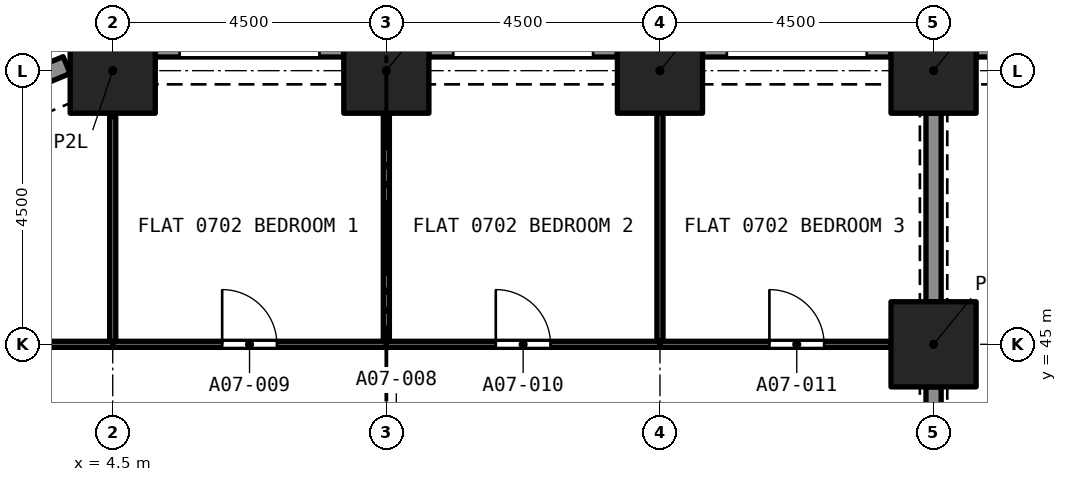
"""IFC4 building model, lengths in metres.
Left out: names, types, materials, properties, quantities, classifications, styles, units other than length and angle.
Written with IfcOpenShell. Run it as: python <this file> out.ifc"""

import sys

from ifc_helpers import new_model, si_unit, direction, frame, frame_2d, origin, origin_2d, place, context, subcontext, project, spatial, rectangle, extrude, element, fill, save


model = new_model("IFC4")
c1 = context("Model", 3, precision=1e-05, world=origin(), true_north=direction((0.0, 1.0)))
c2 = subcontext(c1, "Body", "Model", "MODEL_VIEW")
j1 = project(units=[si_unit("LENGTHUNIT", "METRE"), si_unit("PLANEANGLEUNIT", "RADIAN")], contexts=[c1])
p1 = place(None, origin())
s1 = spatial("IfcSite", under=j1, at=p1, CompositionType="ELEMENT")
p2 = place(p1, origin())
s2 = spatial("IfcBuilding", under=s1, at=p2, CompositionType="ELEMENT")
p3 = place(p2, frame((0.0, 0.0, 33.6)))
s3 = spatial("IfcBuildingStorey", under=s2, at=p3, CompositionType="ELEMENT", Elevation=33.6)
for number, where, z_axis, x_axis in (
    (1, (18.0, 45.0, 0.0), (0.0, 0.0, 1.0), (1.0, 0.0, 0.0)),
    (2, (4.5, 49.5, 0.0), (0.0, 0.0, 1.0), (1.0, 0.0, 0.0)),
    (3, (9.0, 49.5, 0.0), (0.0, 0.0, 1.0), (1.0, 0.0, 0.0)),
    (4, (13.5, 49.5, 0.0), (0.0, 0.0, 1.0), (1.0, 0.0, 0.0)),
    (5, (18.0, 49.5, 0.0), (0.0, 0.0, 1.0), (1.0, 0.0, 0.0)),
):
    element("IfcColumn", number, at=place(p3, frame(where, z_axis=z_axis, x_axis=x_axis)), inside=s3, PredefinedType="COLUMN", context=c2, shape_type="SweptSolid", body=[
        extrude(rectangle(XDim=1.4, YDim=1.4, at=origin_2d()), origin(), (0.0, 0.0, 1.0), 3.2),
    ])
p4 = place(p3, frame((18.7, 49.875, 0.0), z_axis=(0.0, 0.0, 1.0), x_axis=(1.0, 0.0, 0.0)))
e6 = element("IfcWall", 6, at=p4, inside=s3, PredefinedType="SOLIDWALL", context=c2, shape_type="SweptSolid", body=[
    extrude(rectangle(XDim=3.1, YDim=0.3, at=frame_2d((1.55, 0.0))), origin(), (0.0, 0.0, 1.0), 3.2),
])
p5 = place(p4, frame((0.4, 0.0, 0.45)))
e7 = element("IfcOpeningElement", 7, at=p5, cuts=e6, PredefinedType="OPENING", context=c2, shape_type="SweptSolid", body=[
    extrude(rectangle(XDim=2.3, YDim=1.95, at=frame_2d((1.15, 0.975))), frame((0.0, 0.16, 0.0), z_axis=(0.0, -1.0, 0.0), x_axis=(1.0, 0.0, 0.0)), (0.0, 0.0, 1.0), 0.32),
])
p6 = place(p3, frame((14.2, 49.875, 0.0), z_axis=(0.0, 0.0, 1.0), x_axis=(1.0, 0.0, 0.0)))
e8 = element("IfcWall", 8, at=p6, inside=s3, PredefinedType="SOLIDWALL", context=c2, shape_type="SweptSolid", body=[
    extrude(rectangle(XDim=3.1, YDim=0.3, at=frame_2d((1.55, 0.0))), origin(), (0.0, 0.0, 1.0), 3.2),
])
p7 = place(p6, frame((0.4, 0.0, 0.45)))
e9 = element("IfcOpeningElement", 9, at=p7, cuts=e8, PredefinedType="OPENING", context=c2, shape_type="SweptSolid", body=[
    extrude(rectangle(XDim=2.3, YDim=1.95, at=frame_2d((1.15, 0.975))), frame((0.0, 0.16, 0.0), z_axis=(0.0, -1.0, 0.0), x_axis=(1.0, 0.0, 0.0)), (0.0, 0.0, 1.0), 0.32),
])
p8 = place(p3, frame((9.7, 49.875, 0.0), z_axis=(0.0, 0.0, 1.0), x_axis=(1.0, 0.0, 0.0)))
e10 = element("IfcWall", 10, at=p8, inside=s3, PredefinedType="SOLIDWALL", context=c2, shape_type="SweptSolid", body=[
    extrude(rectangle(XDim=3.1, YDim=0.3, at=frame_2d((1.55, 0.0))), origin(), (0.0, 0.0, 1.0), 3.2),
])
p9 = place(p8, frame((0.4, 0.0, 0.45)))
e11 = element("IfcOpeningElement", 11, at=p9, cuts=e10, PredefinedType="OPENING", context=c2, shape_type="SweptSolid", body=[
    extrude(rectangle(XDim=2.3, YDim=1.95, at=frame_2d((1.15, 0.975))), frame((0.0, 0.16, 0.0), z_axis=(0.0, -1.0, 0.0), x_axis=(1.0, 0.0, 0.0)), (0.0, 0.0, 1.0), 0.32),
])
p10 = place(p3, frame((5.2, 49.875, 0.0), z_axis=(0.0, 0.0, 1.0), x_axis=(1.0, 0.0, 0.0)))
e12 = element("IfcWall", 12, at=p10, inside=s3, PredefinedType="SOLIDWALL", context=c2, shape_type="SweptSolid", body=[
    extrude(rectangle(XDim=3.1, YDim=0.3, at=frame_2d((1.55, 0.0))), origin(), (0.0, 0.0, 1.0), 3.2),
])
p11 = place(p10, frame((0.4, 0.0, 0.45)))
e13 = element("IfcOpeningElement", 13, at=p11, cuts=e12, PredefinedType="OPENING", context=c2, shape_type="SweptSolid", body=[
    extrude(rectangle(XDim=2.3, YDim=1.95, at=frame_2d((1.15, 0.975))), frame((0.0, 0.16, 0.0), z_axis=(0.0, -1.0, 0.0), x_axis=(1.0, 0.0, 0.0)), (0.0, 0.0, 1.0), 0.32),
])
p12 = place(p3, frame((2.02, 48.878, 0.0), z_axis=(0.0, 0.0, 1.0), x_axis=(0.923903565336, 0.38262540684, 0.0)))
e14 = element("IfcWall", 14, at=p12, inside=s3, PredefinedType="SOLIDWALL", context=c2, shape_type="SweptSolid", body=[
    extrude(rectangle(XDim=1.865, YDim=0.3, at=frame_2d((0.933, 0.0))), origin(), (0.0, 0.0, 1.0), 3.2),
])
p13 = place(p12, frame((0.258, 0.0, 0.45)))
e15 = element("IfcOpeningElement", 15, at=p13, cuts=e14, PredefinedType="OPENING", context=c2, shape_type="SweptSolid", body=[
    extrude(rectangle(XDim=1.1, YDim=1.95, at=frame_2d((0.55, 0.975))), frame((0.0, 0.16, 0.0), z_axis=(0.0, -1.0, 0.0), x_axis=(1.0, 0.0, 0.0)), (0.0, 0.0, 1.0), 0.32),
])
p14 = place(p3, frame((9.0, 45.05, 0.0), z_axis=(0.0, 0.0, 1.0), x_axis=(0.0, 1.0, 0.0)))
e16 = element("IfcWall", 16, at=p14, inside=s3, PredefinedType="PARTITIONING", context=c2, shape_type="SweptSolid", body=[
    extrude(rectangle(XDim=3.75, YDim=0.1, at=frame_2d((1.875, 0.0))), origin(), (0.0, 0.0, 1.0), 2.9),
])
p15 = place(p3, frame((4.5, 45.0, 0.0), z_axis=(0.0, 0.0, 1.0), x_axis=(1.0, 0.0, 0.0)))
e17 = element("IfcWall", 17, at=p15, inside=s3, PredefinedType="PARTITIONING", context=c2, shape_type="SweptSolid", body=[
    extrude(rectangle(XDim=4.5, YDim=0.1, at=frame_2d((2.25, 0.0))), origin(), (0.0, 0.0, 1.0), 2.9),
])
p16 = place(p15, frame((1.8, 0.0, 0.0)))
e18 = element("IfcOpeningElement", 18, at=p16, cuts=e17, PredefinedType="OPENING", context=c2, shape_type="SweptSolid", body=[
    extrude(rectangle(XDim=0.9, YDim=2.1, at=frame_2d((0.45, 1.05))), frame((0.0, 0.06, 0.0), z_axis=(0.0, -1.0, 0.0), x_axis=(1.0, 0.0, 0.0)), (0.0, 0.0, 1.0), 0.12),
])
p17 = place(p3, frame((4.5, 45.05, 0.0), z_axis=(0.0, 0.0, 1.0), x_axis=(0.0, 1.0, 0.0)))
e19 = element("IfcWall", 19, at=p17, inside=s3, PredefinedType="PARTITIONING", context=c2, shape_type="SweptSolid", body=[
    extrude(rectangle(XDim=3.692, YDim=0.1, at=frame_2d((1.846, 0.0))), origin(), (0.0, 0.0, 1.0), 2.9),
])
p18 = place(p3, frame((13.5, 45.05, 0.0), z_axis=(0.0, 0.0, 1.0), x_axis=(0.0, 1.0, 0.0)))
e20 = element("IfcWall", 20, at=p18, inside=s3, PredefinedType="PARTITIONING", context=c2, shape_type="SweptSolid", body=[
    extrude(rectangle(XDim=3.75, YDim=0.1, at=frame_2d((1.875, 0.0))), origin(), (0.0, 0.0, 1.0), 2.9),
])
p19 = place(p3, frame((9.0, 45.0, 0.0), z_axis=(0.0, 0.0, 1.0), x_axis=(1.0, 0.0, 0.0)))
e21 = element("IfcWall", 21, at=p19, inside=s3, PredefinedType="PARTITIONING", context=c2, shape_type="SweptSolid", body=[
    extrude(rectangle(XDim=4.5, YDim=0.1, at=frame_2d((2.25, 0.0))), origin(), (0.0, 0.0, 1.0), 2.9),
])
p20 = place(p19, frame((1.8, 0.0, 0.0)))
e22 = element("IfcOpeningElement", 22, at=p20, cuts=e21, PredefinedType="OPENING", context=c2, shape_type="SweptSolid", body=[
    extrude(rectangle(XDim=0.9, YDim=2.1, at=frame_2d((0.45, 1.05))), frame((0.0, 0.06, 0.0), z_axis=(0.0, -1.0, 0.0), x_axis=(1.0, 0.0, 0.0)), (0.0, 0.0, 1.0), 0.12),
])
p21 = place(p3, frame((13.5, 45.0, 0.0), z_axis=(0.0, 0.0, 1.0), x_axis=(1.0, 0.0, 0.0)))
e23 = element("IfcWall", 23, at=p21, inside=s3, PredefinedType="PARTITIONING", context=c2, shape_type="SweptSolid", body=[
    extrude(rectangle(XDim=3.8, YDim=0.1, at=frame_2d((1.9, 0.0))), origin(), (0.0, 0.0, 1.0), 2.9),
])
p22 = place(p21, frame((1.8, 0.0, 0.0)))
e24 = element("IfcOpeningElement", 24, at=p22, cuts=e23, PredefinedType="OPENING", context=c2, shape_type="SweptSolid", body=[
    extrude(rectangle(XDim=0.9, YDim=2.1, at=frame_2d((0.45, 1.05))), frame((0.0, 0.06, 0.0), z_axis=(0.0, -1.0, 0.0), x_axis=(1.0, 0.0, 0.0)), (0.0, 0.0, 1.0), 0.12),
])
p23 = place(p3, frame((18.0, 45.7, 0.0), z_axis=(0.0, 0.0, 1.0), x_axis=(0.0, 1.0, 0.0)))
e25 = element("IfcWall", 25, at=p23, inside=s3, PredefinedType="PARTITIONING", context=c2, shape_type="SweptSolid", body=[
    extrude(rectangle(XDim=3.1, YDim=0.25, at=frame_2d((1.55, 0.0))), origin(), (0.0, 0.0, 1.0), 2.38),
])
p24 = place(p3, frame((0.758, 45.0, 0.0), z_axis=(0.0, 0.0, 1.0), x_axis=(1.0, 0.0, 0.0)))
e26 = element("IfcWall", 26, at=p24, inside=s3, PredefinedType="PARTITIONING", context=c2, shape_type="SweptSolid", body=[
    extrude(rectangle(XDim=3.742, YDim=0.1, at=frame_2d((1.871, 0.0))), origin(), (0.0, 0.0, 1.0), 2.9),
])
p25 = place(p24, frame((1.342, 0.0, 0.0)))
e27 = element("IfcOpeningElement", 27, at=p25, cuts=e26, PredefinedType="OPENING", context=c2, shape_type="SweptSolid", body=[
    extrude(rectangle(XDim=1.0, YDim=2.1, at=frame_2d((0.5, 1.05))), frame((0.0, 0.06, 0.0), z_axis=(0.0, -1.0, 0.0), x_axis=(1.0, 0.0, 0.0)), (0.0, 0.0, 1.0), 0.12),
])
p26 = place(p3, frame((18.0, 41.2, 0.0), z_axis=(0.0, 0.0, 1.0), x_axis=(0.0, 1.0, 0.0)))
e28 = element("IfcWall", 28, at=p26, inside=s3, PredefinedType="PARTITIONING", context=c2, shape_type="SweptSolid", body=[
    extrude(rectangle(XDim=3.1, YDim=0.25, at=frame_2d((1.55, 0.0))), origin(), (0.0, 0.0, 1.0), 2.38),
])
p27 = place(p16, origin())
e29 = element("IfcDoor", 29, at=p27, inside=s3, OperationType="SINGLE_SWING_RIGHT", PredefinedType="DOOR", context=c2, shape_type="SweptSolid", body=[
    extrude(rectangle(XDim=0.9, YDim=2.1, at=frame_2d((0.45, 1.05))), frame((0.0, 0.025, 0.0), z_axis=(0.0, -1.0, 0.0), x_axis=(1.0, 0.0, 0.0)), (0.0, 0.0, 1.0), 0.05),
])
fill(e18, e29)
p28 = place(p20, origin())
e30 = element("IfcDoor", 30, at=p28, inside=s3, OperationType="SINGLE_SWING_LEFT", PredefinedType="DOOR", context=c2, shape_type="SweptSolid", body=[
    extrude(rectangle(XDim=0.9, YDim=2.1, at=frame_2d((0.45, 1.05))), frame((0.0, 0.025, 0.0), z_axis=(0.0, -1.0, 0.0), x_axis=(1.0, 0.0, 0.0)), (0.0, 0.0, 1.0), 0.05),
])
fill(e22, e30)
p29 = place(p22, origin())
e31 = element("IfcDoor", 31, at=p29, inside=s3, OperationType="SINGLE_SWING_RIGHT", PredefinedType="DOOR", context=c2, shape_type="SweptSolid", body=[
    extrude(rectangle(XDim=0.9, YDim=2.1, at=frame_2d((0.45, 1.05))), frame((0.0, 0.025, 0.0), z_axis=(0.0, -1.0, 0.0), x_axis=(1.0, 0.0, 0.0)), (0.0, 0.0, 1.0), 0.05),
])
fill(e24, e31)
save(model, sys.argv[1])
